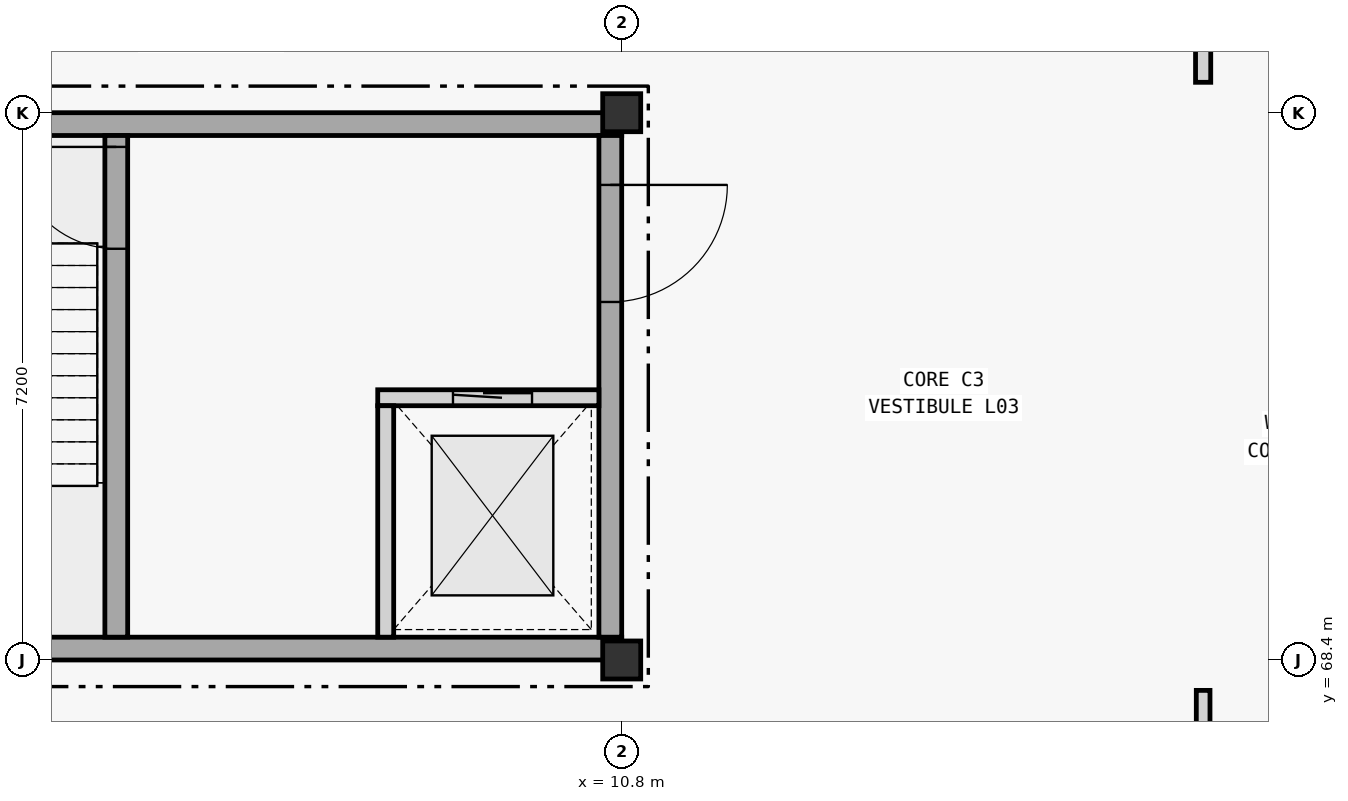
"""IFC4 building model, lengths in metres.
Left out: names, types, materials, properties, quantities, classifications, styles, units other than length and angle.
Written with IfcOpenShell. Run it as: python <this file> out.ifc"""

import sys

from ifc_helpers import new_model, si_unit, direction, frame, frame_2d, origin, origin_2d, place, context, subcontext, project, spatial, rectangle, extrude, element, fill, save


model = new_model("IFC4")
c1 = context("Model", 3, precision=1e-05, world=origin(), true_north=direction((0.0, 1.0)))
c2 = subcontext(c1, "Body", "Model", "MODEL_VIEW")
j1 = project(units=[si_unit("LENGTHUNIT", "METRE"), si_unit("PLANEANGLEUNIT", "RADIAN")], contexts=[c1])
p1 = place(None, origin())
s1 = spatial("IfcSite", under=j1, at=p1, CompositionType="ELEMENT")
p2 = place(p1, origin())
s2 = spatial("IfcBuilding", under=s1, at=p2, CompositionType="ELEMENT")
p3 = place(p2, frame((0.0, 0.0, 15.0)))
s3 = spatial("IfcBuildingStorey", under=s2, at=p3, CompositionType="ELEMENT", Elevation=15.0)
for number, where, z_axis, x_axis in (
    (1, (10.8, 68.4, 0.0), (0.0, 0.0, 1.0), (1.0, 0.0, 0.0)),
    (2, (10.8, 75.6, 0.0), (0.0, 0.0, 1.0), (1.0, 0.0, 0.0)),
):
    element("IfcColumn", number, at=place(p3, frame(where, z_axis=z_axis, x_axis=x_axis)), inside=s3, PredefinedType="COLUMN", context=c2, shape_type="SweptSolid", body=[
        extrude(rectangle(XDim=0.5, YDim=0.5, at=origin_2d()), origin(), (0.0, 0.0, 1.0), 4.2),
    ])
for number, where, z_axis, x_axis in (
    (3, (10.8, 68.55, 0.0), (0.0, 0.0, 1.0), (-1.0, 0.0, 0.0)),
    (4, (0.0, 75.45, 0.0), (0.0, 0.0, 1.0), (1.0, 0.0, 0.0)),
):
    element("IfcWall", number, at=place(p3, frame(where, z_axis=z_axis, x_axis=x_axis)), inside=s3, PredefinedType="SHEAR", context=c2, shape_type="SweptSolid", body=[
        extrude(rectangle(XDim=10.8, YDim=0.3, at=frame_2d((5.4, 0.0))), origin(), (0.0, 0.0, 1.0), 4.2),
    ])
p4 = place(p3, frame((10.65, 75.3, 0.0), z_axis=(0.0, 0.0, 1.0), x_axis=(0.0, -1.0, 0.0)))
e5 = element("IfcWall", 5, at=p4, inside=s3, PredefinedType="SHEAR", context=c2, shape_type="SweptSolid", body=[
    extrude(rectangle(XDim=6.6, YDim=0.3, at=frame_2d((3.3, 0.0))), origin(), (0.0, 0.0, 1.0), 4.2),
])
p5 = place(p4, frame((0.65, 0.0, 0.0)))
e6 = element("IfcOpeningElement", 6, at=p5, cuts=e5, PredefinedType="OPENING", context=c2, shape_type="SweptSolid", body=[
    extrude(rectangle(XDim=1.54, YDim=2.22, at=frame_2d((0.77, 1.11))), frame((0.0, 0.15, 0.0), z_axis=(0.0, -1.0, 0.0), x_axis=(1.0, 0.0, 0.0)), (0.0, 0.0, 1.0), 0.3),
])
p6 = place(p3, frame((4.15, 68.7, 0.0), z_axis=(0.0, 0.0, 1.0), x_axis=(0.0, 1.0, 0.0)))
e7 = element("IfcWall", 7, at=p6, inside=s3, PredefinedType="SHEAR", context=c2, shape_type="SweptSolid", body=[
    extrude(rectangle(XDim=6.6, YDim=0.3, at=frame_2d((3.3, 0.0))), origin(), (0.0, 0.0, 1.0), 4.2),
])
p7 = place(p6, frame((5.11, 0.0, 0.0)))
e8 = element("IfcOpeningElement", 8, at=p7, cuts=e7, PredefinedType="OPENING", context=c2, shape_type="SweptSolid", body=[
    extrude(rectangle(XDim=1.34, YDim=2.18, at=frame_2d((0.67, 1.09))), frame((0.0, 0.15, 0.0), z_axis=(0.0, -1.0, 0.0), x_axis=(1.0, 0.0, 0.0)), (0.0, 0.0, 1.0), 0.3),
])
p8 = place(p3, frame((7.59, 71.85, 0.0), z_axis=(0.0, 0.0, 1.0), x_axis=(1.0, 0.0, 0.0)))
e9 = element("IfcWall", 9, at=p8, inside=s3, PredefinedType="STANDARD", context=c2, shape_type="SweptSolid", body=[
    extrude(rectangle(XDim=2.91, YDim=0.21, at=frame_2d((1.455, 0.0))), origin(), (0.0, 0.0, 1.0), 4.2),
])
p9 = place(p8, frame((0.99, 0.0, 0.0)))
e10 = element("IfcOpeningElement", 10, at=p9, cuts=e9, PredefinedType="OPENING", context=c2, shape_type="SweptSolid", body=[
    extrude(rectangle(XDim=1.04, YDim=2.16, at=frame_2d((0.52, 1.08))), frame((0.0, 0.105, 0.0), z_axis=(0.0, -1.0, 0.0), x_axis=(1.0, 0.0, 0.0)), (0.0, 0.0, 1.0), 0.21),
])
p10 = place(p3, frame((7.695, 68.7, 0.0), z_axis=(0.0, 0.0, 1.0), x_axis=(0.0, 1.0, 0.0)))
e11 = element("IfcWall", 11, at=p10, inside=s3, PredefinedType="STANDARD", context=c2, shape_type="SweptSolid", body=[
    extrude(rectangle(XDim=3.045, YDim=0.21, at=frame_2d((1.522, 0.0))), origin(), (0.0, 0.0, 1.0), 4.2),
])
p11 = place(p3, frame((18.45, 54.4, 0.0), z_axis=(0.0, 0.0, 1.0), x_axis=(0.0, 1.0, 0.0)))
e12 = element("IfcWall", 12, at=p11, inside=s3, PredefinedType="STANDARD", context=c2, shape_type="SweptSolid", body=[
    extrude(rectangle(XDim=13.6, YDim=0.18, at=frame_2d((6.8, 0.0))), origin(), (0.0, 0.0, 1.0), 3.06),
])
p12 = place(p11, frame((6.02, 0.0, 0.0)))
e13 = element("IfcOpeningElement", 13, at=p12, cuts=e12, PredefinedType="OPENING", context=c2, shape_type="SweptSolid", body=[
    extrude(rectangle(XDim=1.56, YDim=2.25, at=frame_2d((0.78, 1.125))), frame((0.0, 0.09, 0.0), z_axis=(0.0, -1.0, 0.0), x_axis=(1.0, 0.0, 0.0)), (0.0, 0.0, 1.0), 0.18),
])
p13 = place(p3, frame((18.45, 76.0, 0.0), z_axis=(0.0, 0.0, 1.0), x_axis=(0.0, 1.0, 0.0)))
e14 = element("IfcWall", 14, at=p13, inside=s3, PredefinedType="STANDARD", context=c2, shape_type="SweptSolid", body=[
    extrude(rectangle(XDim=20.8, YDim=0.2, at=frame_2d((10.4, 0.0))), origin(), (0.0, 0.0, 1.0), 3.06),
])
p14 = place(p13, frame((9.57, 0.0, 0.0)))
e15 = element("IfcOpeningElement", 15, at=p14, cuts=e14, PredefinedType="OPENING", context=c2, shape_type="SweptSolid", body=[
    extrude(rectangle(XDim=1.66, YDim=2.32, at=frame_2d((0.83, 1.16))), frame((0.0, 0.1, 0.0), z_axis=(0.0, -1.0, 0.0), x_axis=(1.0, 0.0, 0.0)), (0.0, 0.0, 1.0), 0.2),
])
p15 = place(p9, origin())
e16 = element("IfcDoor", 16, at=p15, inside=s3, OperationType="SLIDING_TO_LEFT", PredefinedType="DOOR", context=c2, shape_type="SweptSolid", body=[
    extrude(rectangle(XDim=1.04, YDim=2.16, at=frame_2d((0.52, 1.08))), frame((0.0, 0.025, 0.0), z_axis=(0.0, -1.0, 0.0), x_axis=(1.0, 0.0, 0.0)), (0.0, 0.0, 1.0), 0.05),
])
fill(e10, e16)
p16 = place(p7, origin())
e17 = element("IfcDoor", 17, at=p16, inside=s3, OperationType="SINGLE_SWING_RIGHT", PredefinedType="DOOR", context=c2, shape_type="SweptSolid", body=[
    extrude(rectangle(XDim=1.34, YDim=2.18, at=frame_2d((0.67, 1.09))), frame((0.0, 0.025, 0.0), z_axis=(0.0, -1.0, 0.0), x_axis=(1.0, 0.0, 0.0)), (0.0, 0.0, 1.0), 0.05),
])
fill(e8, e17)
p17 = place(p5, origin())
e18 = element("IfcDoor", 18, at=p17, inside=s3, OperationType="SINGLE_SWING_LEFT", PredefinedType="DOOR", context=c2, shape_type="SweptSolid", body=[
    extrude(rectangle(XDim=1.54, YDim=2.22, at=frame_2d((0.77, 1.11))), frame((0.0, 0.025, 0.0), z_axis=(0.0, -1.0, 0.0), x_axis=(1.0, 0.0, 0.0)), (0.0, 0.0, 1.0), 0.05),
])
fill(e6, e18)
save(model, sys.argv[1])
